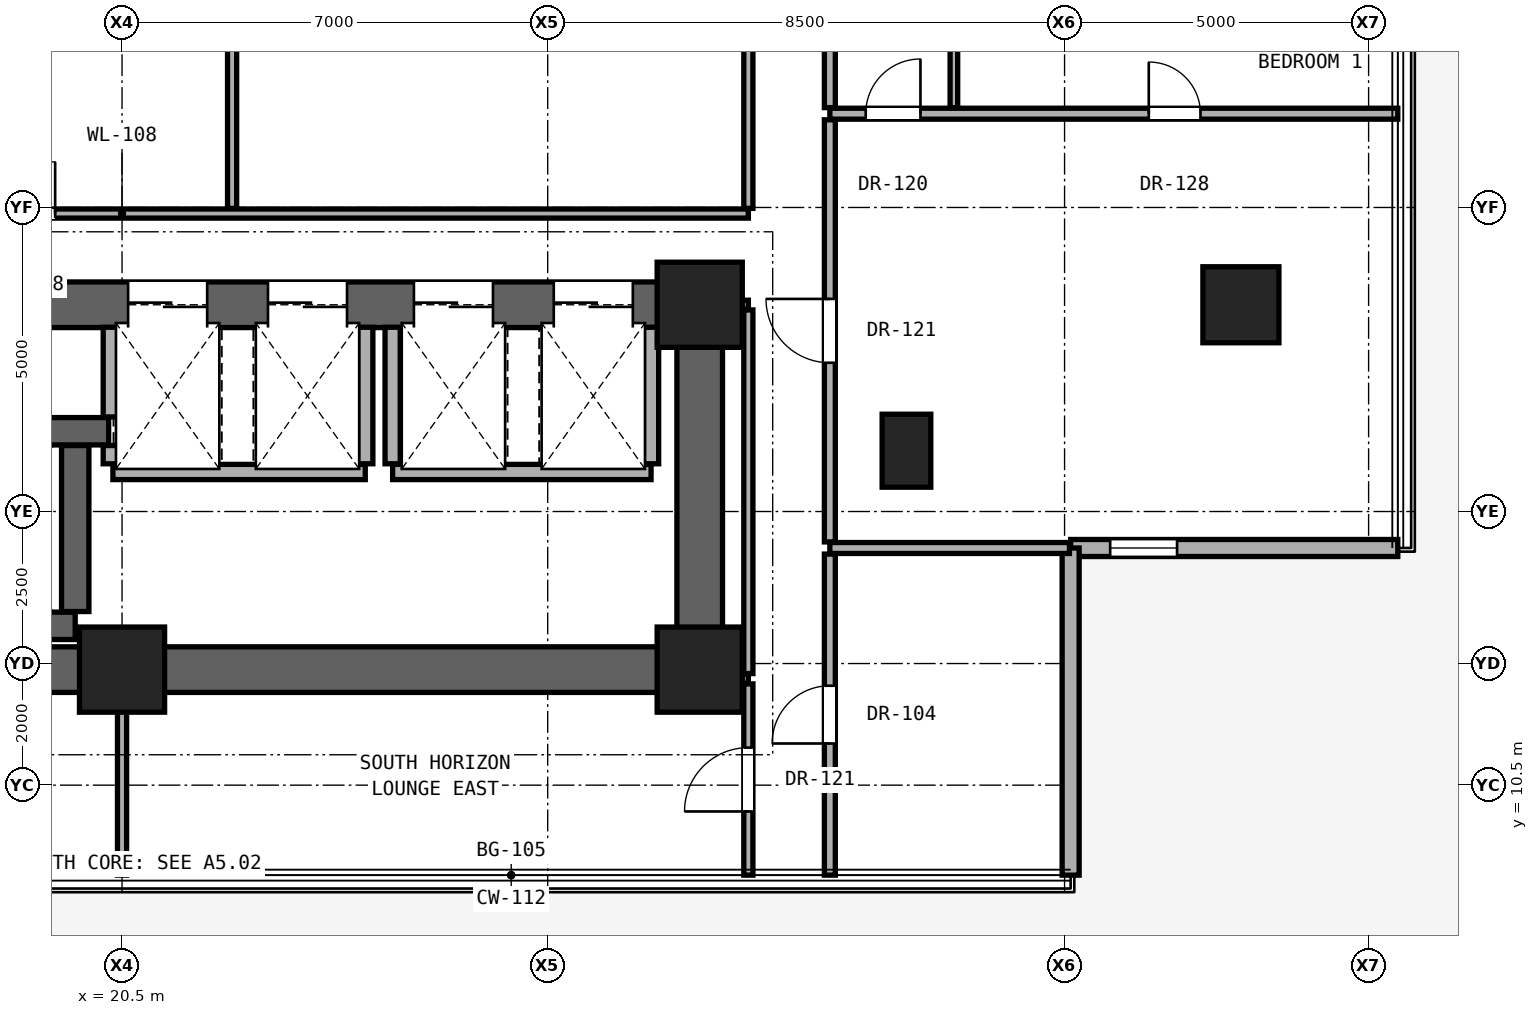
"""IFC4 building model, lengths in metres.
Left out: names, types, materials, properties, quantities, classifications, styles, units other than length and angle.
Written with IfcOpenShell. Run it as: python <this file> out.ifc"""

import sys

from ifc_helpers import new_model, si_unit, direction, frame, frame_2d, origin, origin_2d, place, context, subcontext, project, spatial, rectangle, hollow_rectangle, extrude, element, fill, save


model = new_model("IFC4")
c1 = context("Model", 3, precision=1e-05, world=origin(), true_north=direction((0.0, 1.0)))
c2 = subcontext(c1, "Body", "Model", "MODEL_VIEW")
j1 = project(units=[si_unit("LENGTHUNIT", "METRE"), si_unit("PLANEANGLEUNIT", "RADIAN")], contexts=[c1])
p1 = place(None, origin())
s1 = spatial("IfcSite", under=j1, at=p1, CompositionType="ELEMENT")
p2 = place(p1, origin())
s2 = spatial("IfcBuilding", under=s1, at=p2, CompositionType="ELEMENT")
p3 = place(p2, frame((0.0, 0.0, 22.4)))
s3 = spatial("IfcBuildingStorey", under=s2, at=p3, CompositionType="ELEMENT", Elevation=22.4)
for number, where, z_axis, x_axis in (
    (1, (20.5, 12.4, 0.0), (0.0, 0.0, 1.0), (1.0, 0.0, 0.0)),
    (2, (30.0, 12.4, 0.0), (0.0, 0.0, 1.0), (1.0, 0.0, 0.0)),
    (3, (30.0, 18.4, 0.0), (0.0, 0.0, 1.0), (1.0, 0.0, 0.0)),
):
    element("IfcColumn", number, at=place(p3, frame(where, z_axis=z_axis, x_axis=x_axis)), inside=s3, PredefinedType="COLUMN", context=c2, shape_type="SweptSolid", body=[
        extrude(rectangle(XDim=1.4, YDim=1.4, at=origin_2d()), origin(), (0.0, 0.0, 1.0), 3.3),
    ])
p4 = place(p3, frame((38.9, 18.4, 0.0), z_axis=(0.0, 0.0, 1.0), x_axis=(1.0, 0.0, 0.0)))
e4 = element("IfcColumn", 4, at=p4, inside=s3, PredefinedType="COLUMN", context=c2, shape_type="SweptSolid", body=[
    extrude(hollow_rectangle(XDim=1.25, YDim=1.25, WallThickness=0.07, at=origin_2d()), origin(), (0.0, 0.0, 1.0), 3.3),
])
p5 = place(p3, frame((33.4, 16.0, 0.0), z_axis=(0.0, 0.0, 1.0), x_axis=(1.0, 0.0, 0.0)))
e5 = element("IfcColumn", 5, at=p5, inside=s3, PredefinedType="PILASTER", context=c2, shape_type="SweptSolid", body=[
    extrude(rectangle(XDim=0.8, YDim=1.2, at=origin_2d()), origin(), (0.0, 0.0, 1.0), 3.3),
])
p6 = place(p3, frame((11.0, 12.4, 0.0), z_axis=(0.0, 0.0, 1.0), x_axis=(1.0, 0.0, 0.0)))
e6 = element("IfcWall", 6, at=p6, inside=s3, PredefinedType="SHEAR", context=c2, shape_type="SweptSolid", body=[
    extrude(rectangle(XDim=19.0, YDim=0.75, at=frame_2d((9.5, 0.0))), origin(), (0.0, 0.0, 1.0), 3.06),
])
p7 = place(p3, frame((30.0, 12.4, 0.0), z_axis=(0.0, 0.0, 1.0), x_axis=(0.0, 1.0, 0.0)))
e7 = element("IfcWall", 7, at=p7, inside=s3, PredefinedType="SHEAR", context=c2, shape_type="SweptSolid", body=[
    extrude(rectangle(XDim=6.0, YDim=0.75, at=frame_2d((3.0, 0.0))), origin(), (0.0, 0.0, 1.0), 3.06),
])
p8 = place(p3, frame((11.0, 18.4, 0.0), z_axis=(0.0, 0.0, 1.0), x_axis=(1.0, 0.0, 0.0)))
e8 = element("IfcWall", 8, at=p8, inside=s3, PredefinedType="SHEAR", context=c2, shape_type="SweptSolid", body=[
    extrude(rectangle(XDim=19.0, YDim=0.75, at=frame_2d((9.5, 0.0))), origin(), (0.0, 0.0, 1.0), 3.06),
])
p9 = place(p8, frame((4.175, 0.0, 0.0)))
e9 = element("IfcOpeningElement", 9, at=p9, cuts=e8, PredefinedType="OPENING", context=c2, shape_type="SweptSolid", body=[
    extrude(rectangle(XDim=1.2, YDim=2.25, at=frame_2d((0.6, 1.125))), frame((0.0, 0.385, 0.0), z_axis=(0.0, -1.0, 0.0), x_axis=(1.0, 0.0, 0.0)), (0.0, 0.0, 1.0), 0.77),
])
p10 = place(p8, frame((9.6, 0.0, 0.0)))
e10 = element("IfcOpeningElement", 10, at=p10, cuts=e8, PredefinedType="OPENING", context=c2, shape_type="SweptSolid", body=[
    extrude(rectangle(XDim=1.3, YDim=2.3, at=frame_2d((0.65, 1.15))), frame((0.0, 0.385, 0.0), z_axis=(0.0, -1.0, 0.0), x_axis=(1.0, 0.0, 0.0)), (0.0, 0.0, 1.0), 0.77),
])
p11 = place(p8, frame((11.9, 0.0, 0.0)))
e11 = element("IfcOpeningElement", 11, at=p11, cuts=e8, PredefinedType="OPENING", context=c2, shape_type="SweptSolid", body=[
    extrude(rectangle(XDim=1.3, YDim=2.3, at=frame_2d((0.65, 1.15))), frame((0.0, 0.385, 0.0), z_axis=(0.0, -1.0, 0.0), x_axis=(1.0, 0.0, 0.0)), (0.0, 0.0, 1.0), 0.77),
])
p12 = place(p8, frame((14.3, 0.0, 0.0)))
e12 = element("IfcOpeningElement", 12, at=p12, cuts=e8, PredefinedType="OPENING", context=c2, shape_type="SweptSolid", body=[
    extrude(rectangle(XDim=1.3, YDim=2.3, at=frame_2d((0.65, 1.15))), frame((0.0, 0.385, 0.0), z_axis=(0.0, -1.0, 0.0), x_axis=(1.0, 0.0, 0.0)), (0.0, 0.0, 1.0), 0.77),
])
p13 = place(p8, frame((16.6, 0.0, 0.0)))
e13 = element("IfcOpeningElement", 13, at=p13, cuts=e8, PredefinedType="OPENING", context=c2, shape_type="SweptSolid", body=[
    extrude(rectangle(XDim=1.3, YDim=2.3, at=frame_2d((0.65, 1.15))), frame((0.0, 0.385, 0.0), z_axis=(0.0, -1.0, 0.0), x_axis=(1.0, 0.0, 0.0)), (0.0, 0.0, 1.0), 0.77),
])
p14 = place(p3, frame((36.1, 14.4, 0.0), z_axis=(0.0, 0.0, 1.0), x_axis=(1.0, 0.0, 0.0)))
e14 = element("IfcWall", 14, at=p14, inside=s3, PredefinedType="SOLIDWALL", context=c2, shape_type="SweptSolid", body=[
    extrude(rectangle(XDim=5.38, YDim=0.28, at=frame_2d((2.69, 0.0))), origin(), (0.0, 0.0, 1.0), 3.04),
])
p15 = place(p14, frame((0.65, 0.0, 0.85)))
e15 = element("IfcOpeningElement", 15, at=p15, cuts=e14, PredefinedType="OPENING", context=c2, shape_type="SweptSolid", body=[
    extrude(rectangle(XDim=1.1, YDim=2.0, at=frame_2d((0.55, 1.0))), frame((0.0, 0.15, 0.0), z_axis=(0.0, -1.0, 0.0), x_axis=(1.0, 0.0, 0.0)), (0.0, 0.0, 1.0), 0.3),
])
p16 = place(p3, frame((36.1, 9.02, 0.0), z_axis=(0.0, 0.0, 1.0), x_axis=(0.0, 1.0, 0.0)))
e16 = element("IfcWall", 16, at=p16, inside=s3, PredefinedType="SOLIDWALL", context=c2, shape_type="SweptSolid", body=[
    extrude(rectangle(XDim=5.38, YDim=0.28, at=frame_2d((2.69, 0.0))), origin(), (0.0, 0.0, 1.0), 3.04),
])
p17 = place(p3, frame((30.37, 12.25, 0.0), z_axis=(0.0, 0.0, 1.0), x_axis=(1.0, 0.0, 0.0)))
e17 = element("IfcWall", 17, at=p17, inside=s3, PredefinedType="PARTITIONING", context=c2, shape_type="SweptSolid", body=[
    extrude(rectangle(XDim=0.43, YDim=0.15, at=frame_2d((0.215, 0.0))), origin(), (0.0, 0.0, 1.0), 3.06),
])
p18 = place(p3, frame((11.37, 13.12, 0.0), z_axis=(0.0, 0.0, 1.0), x_axis=(1.0, 0.0, 0.0)))
e18 = element("IfcWall", 18, at=p18, inside=s3, PredefinedType="SHEAR", context=c2, shape_type="SweptSolid", body=[
    extrude(rectangle(XDim=8.36, YDim=0.45, at=frame_2d((4.18, 0.0))), origin(), (0.0, 0.0, 1.0), 3.06),
])
p19 = place(p3, frame((32.14, 14.4, 0.0), z_axis=(0.0, 0.0, 1.0), x_axis=(1.0, 0.0, 0.0)))
e19 = element("IfcWall", 19, at=p19, inside=s3, PredefinedType="PARTITIONING", context=c2, shape_type="SweptSolid", body=[
    extrude(rectangle(XDim=3.94, YDim=0.18, at=frame_2d((1.97, 0.0))), origin(), (0.0, 0.0, 1.0), 3.06),
])
p20 = place(p3, frame((20.35, 15.65, 0.0), z_axis=(0.0, 0.0, 1.0), x_axis=(1.0, 0.0, 0.0)))
e20 = element("IfcWall", 20, at=p20, inside=s3, PredefinedType="SOLIDWALL", context=c2, shape_type="SweptSolid", body=[
    extrude(rectangle(XDim=4.15, YDim=0.25, at=frame_2d((2.075, 0.0))), origin(), (0.0, 0.0, 1.0), 3.06),
])
p21 = place(p3, frame((24.95, 15.65, 0.0), z_axis=(0.0, 0.0, 1.0), x_axis=(1.0, 0.0, 0.0)))
e21 = element("IfcWall", 21, at=p21, inside=s3, PredefinedType="SOLIDWALL", context=c2, shape_type="SweptSolid", body=[
    extrude(rectangle(XDim=4.25, YDim=0.25, at=frame_2d((2.125, 0.0))), origin(), (0.0, 0.0, 1.0), 3.06),
])
p22 = place(p3, frame((11.37, 16.32, 0.0), z_axis=(0.0, 0.0, 1.0), x_axis=(1.0, 0.0, 0.0)))
e22 = element("IfcWall", 22, at=p22, inside=s3, PredefinedType="SHEAR", context=c2, shape_type="SweptSolid", body=[
    extrude(rectangle(XDim=8.91, YDim=0.45, at=frame_2d((4.455, 0.0))), origin(), (0.0, 0.0, 1.0), 3.06),
])
p23 = place(p22, frame((0.47, 0.0, 0.0)))
e23 = element("IfcOpeningElement", 23, at=p23, cuts=e22, PredefinedType="OPENING", context=c2, shape_type="SweptSolid", body=[
    extrude(rectangle(XDim=1.15, YDim=2.2, at=frame_2d((0.575, 1.1))), frame((0.0, 0.235, 0.0), z_axis=(0.0, -1.0, 0.0), x_axis=(1.0, 0.0, 0.0)), (0.0, 0.0, 1.0), 0.47),
])
p24 = place(p3, frame((30.37, 18.4, 0.0), z_axis=(0.0, 0.0, 1.0), x_axis=(1.0, 0.0, 0.0)))
e24 = element("IfcWall", 24, at=p24, inside=s3, PredefinedType="PARTITIONING", context=c2, shape_type="SweptSolid", body=[
    extrude(rectangle(XDim=0.43, YDim=0.15, at=frame_2d((0.215, 0.0))), origin(), (0.0, 0.0, 1.0), 2.436),
])
p25 = place(p3, frame((10.2, 19.9, 0.0), z_axis=(0.0, 0.0, 1.0), x_axis=(1.0, 0.0, 0.0)))
e25 = element("IfcWall", 25, at=p25, inside=s3, PredefinedType="PARTITIONING", context=c2, shape_type="SweptSolid", body=[
    extrude(rectangle(XDim=20.6, YDim=0.15, at=frame_2d((10.3, 0.0))), origin(), (0.0, 0.0, 1.0), 2.104),
])
p26 = place(p25, frame((1.695, 0.0, 0.0)))
e26 = element("IfcOpeningElement", 26, at=p26, cuts=e25, PredefinedType="OPENING", context=c2, shape_type="SweptSolid", body=[
    extrude(rectangle(XDim=0.85, YDim=2.01, at=frame_2d((0.425, 1.005))), frame((0.0, 0.085, 0.0), z_axis=(0.0, -1.0, 0.0), x_axis=(1.0, 0.0, 0.0)), (0.0, 0.0, 1.0), 0.17),
])
p27 = place(p25, frame((3.795, 0.0, 0.0)))
e27 = element("IfcOpeningElement", 27, at=p27, cuts=e25, PredefinedType="OPENING", context=c2, shape_type="SweptSolid", body=[
    extrude(rectangle(XDim=0.85, YDim=2.01, at=frame_2d((0.425, 1.005))), frame((0.0, 0.085, 0.0), z_axis=(0.0, -1.0, 0.0), x_axis=(1.0, 0.0, 0.0)), (0.0, 0.0, 1.0), 0.17),
])
p28 = place(p25, frame((8.35, 0.0, 0.0)))
e28 = element("IfcOpeningElement", 28, at=p28, cuts=e25, PredefinedType="OPENING", context=c2, shape_type="SweptSolid", body=[
    extrude(rectangle(XDim=0.85, YDim=2.01, at=frame_2d((0.425, 1.005))), frame((0.0, 0.085, 0.0), z_axis=(0.0, -1.0, 0.0), x_axis=(1.0, 0.0, 0.0)), (0.0, 0.0, 1.0), 0.17),
])
p29 = place(p3, frame((32.14, 21.542, 0.0), z_axis=(0.0, 0.0, 1.0), x_axis=(1.0, 0.0, 0.0)))
e29 = element("IfcWall", 29, at=p29, inside=s3, PredefinedType="PARTITIONING", context=c2, shape_type="SweptSolid", body=[
    extrude(rectangle(XDim=9.34, YDim=0.18, at=frame_2d((4.67, 0.0))), origin(), (0.0, 0.0, 1.0), 2.125),
])
p30 = place(p29, frame((5.245, 0.0, 0.0)))
e30 = element("IfcOpeningElement", 30, at=p30, cuts=e29, PredefinedType="OPENING", context=c2, shape_type="SweptSolid", body=[
    extrude(rectangle(XDim=0.85, YDim=2.01, at=frame_2d((0.425, 1.005))), frame((0.0, 0.1, 0.0), z_axis=(0.0, -1.0, 0.0), x_axis=(1.0, 0.0, 0.0)), (0.0, 0.0, 1.0), 0.2),
])
p31 = place(p29, frame((0.59, 0.0, 0.0)))
e31 = element("IfcOpeningElement", 31, at=p31, cuts=e29, PredefinedType="OPENING", context=c2, shape_type="SweptSolid", body=[
    extrude(rectangle(XDim=0.9, YDim=2.1, at=frame_2d((0.45, 1.05))), frame((0.0, 0.1, 0.0), z_axis=(0.0, -1.0, 0.0), x_axis=(1.0, 0.0, 0.0)), (0.0, 0.0, 1.0), 0.2),
])
p32 = place(p3, frame((19.73, 13.355, 0.0), z_axis=(0.0, 0.0, 1.0), x_axis=(0.0, 1.0, 0.0)))
e32 = element("IfcWall", 32, at=p32, inside=s3, PredefinedType="SHEAR", context=c2, shape_type="SweptSolid", body=[
    extrude(rectangle(XDim=2.73, YDim=0.45, at=frame_2d((1.365, 0.0))), origin(), (0.0, 0.0, 1.0), 3.06),
])
p33 = place(p3, frame((20.315, 15.785, 0.0), z_axis=(0.0, 0.0, 1.0), x_axis=(0.0, 1.0, 0.0)))
e33 = element("IfcWall", 33, at=p33, inside=s3, PredefinedType="SOLIDWALL", context=c2, shape_type="SweptSolid", body=[
    extrude(rectangle(XDim=0.3, YDim=0.25, at=frame_2d((0.15, 0.0))), origin(), (0.0, 0.0, 1.0), 3.06),
])
p34 = place(p3, frame((20.315, 16.555, 0.0), z_axis=(0.0, 0.0, 1.0), x_axis=(0.0, 1.0, 0.0)))
e34 = element("IfcWall", 34, at=p34, inside=s3, PredefinedType="SOLIDWALL", context=c2, shape_type="SweptSolid", body=[
    extrude(rectangle(XDim=1.475, YDim=0.25, at=frame_2d((0.738, 0.0))), origin(), (0.0, 0.0, 1.0), 3.06),
])
p35 = place(p3, frame((20.5, 9.02, 0.0), z_axis=(0.0, 0.0, 1.0), x_axis=(0.0, 1.0, 0.0)))
e35 = element("IfcWall", 35, at=p35, inside=s3, PredefinedType="PARTITIONING", context=c2, shape_type="SweptSolid", body=[
    extrude(rectangle(XDim=3.01, YDim=0.15, at=frame_2d((1.505, 0.0))), origin(), (0.0, 0.0, 1.0), 3.06),
])
p36 = place(p3, frame((22.31, 19.985, 0.0), z_axis=(0.0, 0.0, 1.0), x_axis=(0.0, 1.0, 0.0)))
e36 = element("IfcWall", 36, at=p36, inside=s3, PredefinedType="PARTITIONING", context=c2, shape_type="SweptSolid", body=[
    extrude(rectangle(XDim=13.03, YDim=0.15, at=frame_2d((6.515, 0.0))), origin(), (0.0, 0.0, 1.0), 2.104),
])
for number, where, z_axis, x_axis in (
    (37, (24.5, 15.785, 0.0), (0.0, 0.0, 1.0), (0.0, 1.0, 0.0)),
    (38, (24.95, 15.785, 0.0), (0.0, 0.0, 1.0), (0.0, 1.0, 0.0)),
    (39, (29.2, 15.785, 0.0), (0.0, 0.0, 1.0), (0.0, 1.0, 0.0)),
):
    element("IfcWall", number, at=place(p3, frame(where, z_axis=z_axis, x_axis=x_axis)), inside=s3, PredefinedType="SOLIDWALL", context=c2, shape_type="SweptSolid", body=[
        extrude(rectangle(XDim=2.245, YDim=0.25, at=frame_2d((1.123, 0.0))), origin(), (0.0, 0.0, 1.0), 3.06),
    ])
p37 = place(p3, frame((30.8, 9.02, 0.0), z_axis=(0.0, 0.0, 1.0), x_axis=(0.0, 1.0, 0.0)))
e40 = element("IfcWall", 40, at=p37, inside=s3, PredefinedType="PARTITIONING", context=c2, shape_type="SweptSolid", body=[
    extrude(rectangle(XDim=3.145, YDim=0.15, at=frame_2d((1.573, 0.0))), origin(), (0.0, 0.0, 1.0), 3.06),
])
p38 = place(p37, frame((1.048, 0.0, 0.0)))
e41 = element("IfcOpeningElement", 41, at=p38, cuts=e40, PredefinedType="OPENING", context=c2, shape_type="SweptSolid", body=[
    extrude(rectangle(XDim=1.05, YDim=2.2, at=frame_2d((0.525, 1.1))), frame((0.0, 0.085, 0.0), z_axis=(0.0, -1.0, 0.0), x_axis=(1.0, 0.0, 0.0)), (0.0, 0.0, 1.0), 0.17),
])
p39 = place(p3, frame((30.8, 12.335, 0.0), z_axis=(0.0, 0.0, 1.0), x_axis=(0.0, 1.0, 0.0)))
e42 = element("IfcWall", 42, at=p39, inside=s3, PredefinedType="PARTITIONING", context=c2, shape_type="SweptSolid", body=[
    extrude(rectangle(XDim=5.98, YDim=0.15, at=frame_2d((2.99, 0.0))), origin(), (0.0, 0.0, 1.0), 2.436),
])
p40 = place(p3, frame((30.8, 19.985, 0.0), z_axis=(0.0, 0.0, 1.0), x_axis=(0.0, 1.0, 0.0)))
e43 = element("IfcWall", 43, at=p40, inside=s3, PredefinedType="PARTITIONING", context=c2, shape_type="SweptSolid", body=[
    extrude(rectangle(XDim=13.03, YDim=0.15, at=frame_2d((6.515, 0.0))), origin(), (0.0, 0.0, 1.0), 2.279),
])
p41 = place(p3, frame((32.14, 9.02, 0.0), z_axis=(0.0, 0.0, 1.0), x_axis=(0.0, 1.0, 0.0)))
e44 = element("IfcWall", 44, at=p41, inside=s3, PredefinedType="PARTITIONING", context=c2, shape_type="SweptSolid", body=[
    extrude(rectangle(XDim=5.28, YDim=0.18, at=frame_2d((2.64, 0.0))), origin(), (0.0, 0.0, 1.0), 3.06),
])
p42 = place(p41, frame((2.165, 0.0, 0.0)))
e45 = element("IfcOpeningElement", 45, at=p42, cuts=e44, PredefinedType="OPENING", context=c2, shape_type="SweptSolid", body=[
    extrude(rectangle(XDim=0.95, YDim=2.15, at=frame_2d((0.475, 1.075))), frame((0.0, 0.1, 0.0), z_axis=(0.0, -1.0, 0.0), x_axis=(1.0, 0.0, 0.0)), (0.0, 0.0, 1.0), 0.2),
])
p43 = place(p3, frame((32.14, 14.5, 0.0), z_axis=(0.0, 0.0, 1.0), x_axis=(0.0, 1.0, 0.0)))
e46 = element("IfcWall", 46, at=p43, inside=s3, PredefinedType="PARTITIONING", context=c2, shape_type="SweptSolid", body=[
    extrude(rectangle(XDim=6.942, YDim=0.18, at=frame_2d((3.471, 0.0))), origin(), (0.0, 0.0, 1.0), 2.436),
])
p44 = place(p43, frame((2.946, 0.0, 0.0)))
e47 = element("IfcOpeningElement", 47, at=p44, cuts=e46, PredefinedType="OPENING", context=c2, shape_type="SweptSolid", body=[
    extrude(rectangle(XDim=1.05, YDim=2.2, at=frame_2d((0.525, 1.1))), frame((0.0, 0.1, 0.0), z_axis=(0.0, -1.0, 0.0), x_axis=(1.0, 0.0, 0.0)), (0.0, 0.0, 1.0), 0.2),
])
p45 = place(p3, frame((32.14, 21.642, 0.0), z_axis=(0.0, 0.0, 1.0), x_axis=(0.0, 1.0, 0.0)))
e48 = element("IfcWall", 48, at=p45, inside=s3, PredefinedType="PARTITIONING", context=c2, shape_type="SweptSolid", body=[
    extrude(rectangle(XDim=2.1, YDim=0.18, at=frame_2d((1.05, 0.0))), origin(), (0.0, 0.0, 1.0), 3.06),
])
p46 = place(p3, frame((34.18, 21.642, 0.0), z_axis=(0.0, 0.0, 1.0), x_axis=(0.0, 1.0, 0.0)))
e49 = element("IfcWall", 49, at=p46, inside=s3, PredefinedType="PARTITIONING", context=c2, shape_type="SweptSolid", body=[
    extrude(rectangle(XDim=2.1, YDim=0.125, at=frame_2d((1.05, 0.0))), origin(), (0.0, 0.0, 1.0), 3.06),
])
p47 = place(p15, origin())
e50 = element("IfcWindow", 50, at=p47, inside=s3, PartitioningType="SINGLE_PANEL", PredefinedType="WINDOW", context=c2, shape_type="SweptSolid", body=[
    extrude(rectangle(XDim=1.1, YDim=2.0, at=frame_2d((0.55, 1.0))), frame((0.0, 0.03, 0.0), z_axis=(0.0, -1.0, 0.0), x_axis=(1.0, 0.0, 0.0)), (0.0, 0.0, 1.0), 0.06),
])
fill(e15, e50)
p48 = place(p44, origin())
e51 = element("IfcDoor", 51, at=p48, inside=s3, OperationType="SINGLE_SWING_RIGHT", PredefinedType="DOOR", context=c2, shape_type="SweptSolid", body=[
    extrude(rectangle(XDim=1.05, YDim=2.2, at=frame_2d((0.525, 1.1))), frame((0.0, 0.025, 0.0), z_axis=(0.0, -1.0, 0.0), x_axis=(1.0, 0.0, 0.0)), (0.0, 0.0, 1.0), 0.05),
])
fill(e47, e51)
p49 = place(p30, origin())
e52 = element("IfcDoor", 52, at=p49, inside=s3, OperationType="SINGLE_SWING_LEFT", PredefinedType="DOOR", context=c2, shape_type="SweptSolid", body=[
    extrude(rectangle(XDim=0.85, YDim=2.01, at=frame_2d((0.425, 1.005))), frame((0.0, 0.025, 0.0), z_axis=(0.0, -1.0, 0.0), x_axis=(1.0, 0.0, 0.0)), (0.0, 0.0, 1.0), 0.05),
])
fill(e30, e52)
p50 = place(p31, origin())
e53 = element("IfcDoor", 53, at=p50, inside=s3, OperationType="SINGLE_SWING_RIGHT", PredefinedType="DOOR", context=c2, shape_type="SweptSolid", body=[
    extrude(rectangle(XDim=0.9, YDim=2.1, at=frame_2d((0.45, 1.05))), frame((0.0, 0.025, 0.0), z_axis=(0.0, -1.0, 0.0), x_axis=(1.0, 0.0, 0.0)), (0.0, 0.0, 1.0), 0.05),
])
fill(e31, e53)
p51 = place(p28, origin())
e54 = element("IfcDoor", 54, at=p51, inside=s3, OperationType="SINGLE_SWING_RIGHT", PredefinedType="DOOR", context=c2, shape_type="SweptSolid", body=[
    extrude(rectangle(XDim=0.85, YDim=2.01, at=frame_2d((0.425, 1.005))), frame((0.0, 0.025, 0.0), z_axis=(0.0, -1.0, 0.0), x_axis=(1.0, 0.0, 0.0)), (0.0, 0.0, 1.0), 0.05),
])
fill(e28, e54)
p52 = place(p38, origin())
e55 = element("IfcDoor", 55, at=p52, inside=s3, OperationType="SINGLE_SWING_LEFT", PredefinedType="DOOR", context=c2, shape_type="SweptSolid", body=[
    extrude(rectangle(XDim=1.05, YDim=2.2, at=frame_2d((0.525, 1.1))), frame((0.0, 0.025, 0.0), z_axis=(0.0, -1.0, 0.0), x_axis=(1.0, 0.0, 0.0)), (0.0, 0.0, 1.0), 0.05),
])
fill(e41, e55)
p53 = place(p42, origin())
e56 = element("IfcDoor", 56, at=p53, inside=s3, OperationType="SINGLE_SWING_LEFT", PredefinedType="DOOR", context=c2, shape_type="SweptSolid", body=[
    extrude(rectangle(XDim=0.95, YDim=2.15, at=frame_2d((0.475, 1.075))), frame((0.0, 0.025, 0.0), z_axis=(0.0, -1.0, 0.0), x_axis=(1.0, 0.0, 0.0)), (0.0, 0.0, 1.0), 0.05),
])
fill(e45, e56)
p54 = place(p10, origin())
e57 = element("IfcDoor", 57, at=p54, inside=s3, OperationType="DOUBLE_DOOR_SLIDING", PredefinedType="DOOR", context=c2, shape_type="SweptSolid", body=[
    extrude(rectangle(XDim=1.3, YDim=2.3, at=frame_2d((0.65, 1.15))), frame((0.0, 0.025, 0.0), z_axis=(0.0, -1.0, 0.0), x_axis=(1.0, 0.0, 0.0)), (0.0, 0.0, 1.0), 0.05),
])
fill(e10, e57)
p55 = place(p11, origin())
e58 = element("IfcDoor", 58, at=p55, inside=s3, OperationType="DOUBLE_DOOR_SLIDING", PredefinedType="DOOR", context=c2, shape_type="SweptSolid", body=[
    extrude(rectangle(XDim=1.3, YDim=2.3, at=frame_2d((0.65, 1.15))), frame((0.0, 0.025, 0.0), z_axis=(0.0, -1.0, 0.0), x_axis=(1.0, 0.0, 0.0)), (0.0, 0.0, 1.0), 0.05),
])
fill(e11, e58)
p56 = place(p12, origin())
e59 = element("IfcDoor", 59, at=p56, inside=s3, OperationType="DOUBLE_DOOR_SLIDING", PredefinedType="DOOR", context=c2, shape_type="SweptSolid", body=[
    extrude(rectangle(XDim=1.3, YDim=2.3, at=frame_2d((0.65, 1.15))), frame((0.0, 0.025, 0.0), z_axis=(0.0, -1.0, 0.0), x_axis=(1.0, 0.0, 0.0)), (0.0, 0.0, 1.0), 0.05),
])
fill(e12, e59)
p57 = place(p13, origin())
e60 = element("IfcDoor", 60, at=p57, inside=s3, OperationType="DOUBLE_DOOR_SLIDING", PredefinedType="DOOR", context=c2, shape_type="SweptSolid", body=[
    extrude(rectangle(XDim=1.3, YDim=2.3, at=frame_2d((0.65, 1.15))), frame((0.0, 0.025, 0.0), z_axis=(0.0, -1.0, 0.0), x_axis=(1.0, 0.0, 0.0)), (0.0, 0.0, 1.0), 0.05),
])
fill(e13, e60)
save(model, sys.argv[1])
